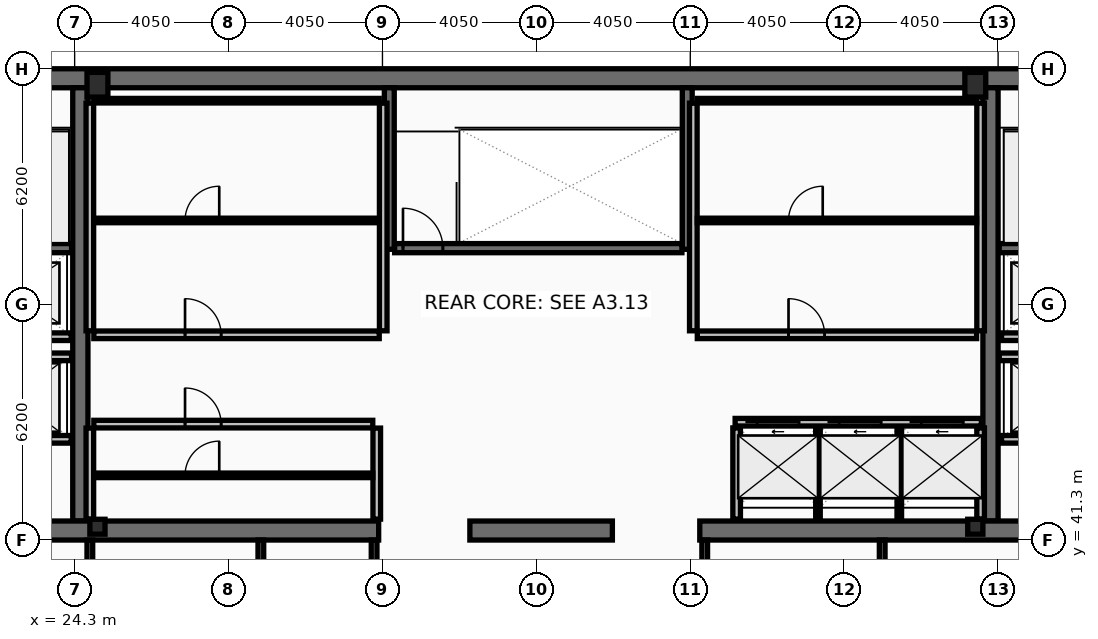
"""IFC4 building model, lengths in metres.
Left out: names, types, materials, properties, quantities, classifications, styles, units other than length and angle.
Written with IfcOpenShell. Run it as: python <this file> out.ifc"""

import sys

from ifc_helpers import new_model, si_unit, direction, frame, frame_2d, origin, origin_2d, place, context, subcontext, project, spatial, rectangle, hollow_rectangle, i_section, extrude, element, fill, save


model = new_model("IFC4")
c1 = context("Model", 3, precision=1e-05, world=origin(), true_north=direction((0.0, 1.0)))
c2 = subcontext(c1, "Body", "Model", "MODEL_VIEW")
j1 = project(units=[si_unit("LENGTHUNIT", "METRE"), si_unit("PLANEANGLEUNIT", "RADIAN")], contexts=[c1])
p1 = place(None, origin())
s1 = spatial("IfcSite", under=j1, at=p1, CompositionType="ELEMENT")
p2 = place(p1, origin())
s2 = spatial("IfcBuilding", under=s1, at=p2, CompositionType="ELEMENT")
p3 = place(p2, frame((0.0, 0.0, 347.0)))
s3 = spatial("IfcBuildingStorey", under=s2, at=p3, CompositionType="ELEMENT", Elevation=347.0)
p4 = place(p3, frame((16.2, 53.45, 0.0), z_axis=(0.0, 0.0, 1.0), x_axis=(1.0, 0.0, 0.0)))
e1 = element("IfcWall", 1, at=p4, inside=s3, PredefinedType="SHEAR", context=c2, shape_type="SweptSolid", body=[
    extrude(rectangle(XDim=40.5, YDim=0.5, at=frame_2d((20.25, 0.0))), origin(), (0.0, 0.0, 1.0), 3.38),
])
for number, where, z_axis, x_axis in (
    (2, (24.45, 41.8, 0.0), (0.0, 0.0, 1.0), (0.0, 1.0, 0.0)),
    (3, (48.4, 41.8, 0.0), (0.0, 0.0, 1.0), (0.0, 1.0, 0.0)),
):
    element("IfcWall", number, at=place(p3, frame(where, z_axis=z_axis, x_axis=x_axis)), inside=s3, PredefinedType="SHEAR", context=c2, shape_type="SweptSolid", body=[
        extrude(rectangle(XDim=11.4, YDim=0.4, at=frame_2d((5.7, 0.0))), origin(), (0.0, 0.0, 1.0), 3.38),
    ])
p5 = place(p3, frame((32.3, 41.55, 0.0), z_axis=(0.0, 0.0, 1.0), x_axis=(-1.0, 0.0, 0.0)))
e4 = element("IfcWall", 4, at=p5, inside=s3, PredefinedType="SHEAR", context=c2, shape_type="SweptSolid", body=[
    extrude(rectangle(XDim=11.45, YDim=0.5, at=frame_2d((5.725, 0.0))), origin(), (0.0, 0.0, 1.0), 3.38),
])
p6 = place(p3, frame((38.45, 41.55, 0.0), z_axis=(0.0, 0.0, 1.0), x_axis=(-1.0, 0.0, 0.0)))
e5 = element("IfcWall", 5, at=p6, inside=s3, PredefinedType="SHEAR", context=c2, shape_type="SweptSolid", body=[
    extrude(rectangle(XDim=3.75, YDim=0.5, at=frame_2d((1.875, 0.0))), origin(), (0.0, 0.0, 1.0), 3.38),
])
p7 = place(p3, frame((52.05, 41.55, 0.0), z_axis=(0.0, 0.0, 1.0), x_axis=(-1.0, 0.0, 0.0)))
e6 = element("IfcWall", 6, at=p7, inside=s3, PredefinedType="SHEAR", context=c2, shape_type="SweptSolid", body=[
    extrude(rectangle(XDim=11.3, YDim=0.5, at=frame_2d((5.65, 0.0))), origin(), (0.0, 0.0, 1.0), 3.38),
])
for number, where, z_axis, x_axis in (
    (7, (32.58, 48.95, 0.0), (0.0, 0.0, 1.0), (0.0, 1.0, 0.0)),
    (8, (40.42, 48.95, 0.0), (0.0, 0.0, 1.0), (0.0, 1.0, 0.0)),
):
    element("IfcWall", number, at=place(p3, frame(where, z_axis=z_axis, x_axis=x_axis)), inside=s3, PredefinedType="SHEAR", context=c2, shape_type="SweptSolid", body=[
        extrude(rectangle(XDim=4.25, YDim=0.26, at=frame_2d((2.125, 0.0))), origin(), (0.0, 0.0, 1.0), 3.38),
    ])
p8 = place(p3, frame((16.7, 48.98, 0.0), z_axis=(0.0, 0.0, 1.0), x_axis=(1.0, 0.0, 0.0)))
e9 = element("IfcWall", 9, at=p8, inside=s3, PredefinedType="SHEAR", context=c2, shape_type="SweptSolid", body=[
    extrude(rectangle(XDim=7.52, YDim=0.24, at=frame_2d((3.76, 0.0))), origin(), (0.0, 0.0, 1.0), 3.38),
])
p9 = place(p8, frame((0.22, 0.0, 0.0)))
e10 = element("IfcOpeningElement", 10, at=p9, cuts=e9, PredefinedType="OPENING", context=c2, shape_type="SweptSolid", body=[
    extrude(rectangle(XDim=1.05, YDim=2.15, at=frame_2d((0.525, 1.075))), frame((0.0, 0.13, 0.0), z_axis=(0.0, -1.0, 0.0), x_axis=(1.0, 0.0, 0.0)), (0.0, 0.0, 1.0), 0.26),
])
p10 = place(p3, frame((48.63, 48.98, 0.0), z_axis=(0.0, 0.0, 1.0), x_axis=(1.0, 0.0, 0.0)))
e11 = element("IfcWall", 11, at=p10, inside=s3, PredefinedType="SHEAR", context=c2, shape_type="SweptSolid", body=[
    extrude(rectangle(XDim=7.57, YDim=0.24, at=frame_2d((3.785, 0.0))), origin(), (0.0, 0.0, 1.0), 3.38),
])
p11 = place(p10, frame((6.3, 0.0, 0.0)))
e12 = element("IfcOpeningElement", 12, at=p11, cuts=e11, PredefinedType="OPENING", context=c2, shape_type="SweptSolid", body=[
    extrude(rectangle(XDim=1.05, YDim=2.15, at=frame_2d((0.525, 1.075))), frame((0.0, 0.13, 0.0), z_axis=(0.0, -1.0, 0.0), x_axis=(1.0, 0.0, 0.0)), (0.0, 0.0, 1.0), 0.26),
])
p12 = place(p3, frame((32.72, 48.98, 0.0), z_axis=(0.0, 0.0, 1.0), x_axis=(1.0, 0.0, 0.0)))
e13 = element("IfcWall", 13, at=p12, inside=s3, PredefinedType="SHEAR", context=c2, shape_type="SweptSolid", body=[
    extrude(rectangle(XDim=7.56, YDim=0.24, at=frame_2d((3.78, 0.0))), origin(), (0.0, 0.0, 1.0), 3.38),
])
p13 = place(p12, frame((0.22, 0.0, 0.0)))
e14 = element("IfcOpeningElement", 14, at=p13, cuts=e13, PredefinedType="OPENING", context=c2, shape_type="SweptSolid", body=[
    extrude(rectangle(XDim=1.05, YDim=2.15, at=frame_2d((0.525, 1.075))), frame((0.0, 0.13, 0.0), z_axis=(0.0, -1.0, 0.0), x_axis=(1.0, 0.0, 0.0)), (0.0, 0.0, 1.0), 0.26),
])
for number, where, z_axis, x_axis in (
    (15, (24.9, 53.28, 0.0), (0.0, 0.0, 1.0), (1.0, 0.0, 0.0)),
    (16, (48.0, 53.28, 0.0), (0.0, 0.0, 1.0), (1.0, 0.0, 0.0)),
):
    element("IfcColumn", number, at=place(p3, frame(where, z_axis=z_axis, x_axis=x_axis)), inside=s3, PredefinedType="COLUMN", context=c2, shape_type="SweptSolid", body=[
        extrude(hollow_rectangle(XDim=0.55, YDim=0.65, WallThickness=0.04, at=origin_2d()), origin(), (0.0, 0.0, 1.0), 3.6),
    ])
for number, where, z_axis, x_axis in (
    (17, (24.9, 41.65, 0.0), (0.0, 0.0, 1.0), (1.0, 0.0, 0.0)),
    (18, (48.0, 41.65, 0.0), (0.0, 0.0, 1.0), (1.0, 0.0, 0.0)),
):
    element("IfcColumn", number, at=place(p3, frame(where, z_axis=z_axis, x_axis=x_axis)), inside=s3, PredefinedType="COLUMN", context=c2, shape_type="SweptSolid", body=[
        extrude(i_section(OverallWidth=0.399, OverallDepth=0.393, WebThickness=0.023, FlangeThickness=0.037, at=origin_2d()), origin(), (0.0, 0.0, 1.0), 3.6),
    ])
p14 = place(p3, frame((41.68, 44.4, 0.0), z_axis=(0.0, 0.0, 1.0), x_axis=(1.0, 0.0, 0.0)))
e19 = element("IfcWall", 19, at=p14, inside=s3, PredefinedType="PARTITIONING", context=c2, shape_type="SweptSolid", body=[
    extrude(rectangle(XDim=6.48, YDim=0.2, at=frame_2d((3.24, 0.0))), origin(), (0.0, 0.0, 1.0), 3.38),
])
p15 = place(p14, frame((0.58, 0.0, 0.0)))
e20 = element("IfcOpeningElement", 20, at=p15, cuts=e19, PredefinedType="OPENING", context=c2, shape_type="SweptSolid", body=[
    extrude(rectangle(XDim=1.1, YDim=2.18, at=frame_2d((0.55, 1.09))), frame((0.0, 0.11, 0.0), z_axis=(0.0, -1.0, 0.0), x_axis=(1.0, 0.0, 0.0)), (0.0, 0.0, 1.0), 0.22),
])
p16 = place(p14, frame((2.74, 0.0, 0.0)))
e21 = element("IfcOpeningElement", 21, at=p16, cuts=e19, PredefinedType="OPENING", context=c2, shape_type="SweptSolid", body=[
    extrude(rectangle(XDim=1.1, YDim=2.18, at=frame_2d((0.55, 1.09))), frame((0.0, 0.11, 0.0), z_axis=(0.0, -1.0, 0.0), x_axis=(1.0, 0.0, 0.0)), (0.0, 0.0, 1.0), 0.22),
])
p17 = place(p14, frame((4.9, 0.0, 0.0)))
e22 = element("IfcOpeningElement", 22, at=p17, cuts=e19, PredefinedType="OPENING", context=c2, shape_type="SweptSolid", body=[
    extrude(rectangle(XDim=1.1, YDim=2.18, at=frame_2d((0.55, 1.09))), frame((0.0, 0.11, 0.0), z_axis=(0.0, -1.0, 0.0), x_axis=(1.0, 0.0, 0.0)), (0.0, 0.0, 1.0), 0.22),
])
p18 = place(p3, frame((51.61, 43.95, 0.0), z_axis=(0.0, 0.0, 1.0), x_axis=(-1.0, 0.0, 0.0)))
e23 = element("IfcWall", 23, at=p18, inside=s3, PredefinedType="PARTITIONING", context=c2, shape_type="SweptSolid", body=[
    extrude(rectangle(XDim=2.92, YDim=0.2, at=frame_2d((1.46, 0.0))), origin(), (0.0, 0.0, 1.0), 3.38),
])
p19 = place(p18, frame((0.81, 0.0, 0.0)))
e24 = element("IfcOpeningElement", 24, at=p19, cuts=e23, PredefinedType="OPENING", context=c2, shape_type="SweptSolid", body=[
    extrude(rectangle(XDim=1.3, YDim=2.18, at=frame_2d((0.65, 1.09))), frame((0.0, 0.11, 0.0), z_axis=(0.0, -1.0, 0.0), x_axis=(1.0, 0.0, 0.0)), (0.0, 0.0, 1.0), 0.22),
])
p20 = place(p3, frame((24.21, 43.95, 0.0), z_axis=(0.0, 0.0, 1.0), x_axis=(-1.0, 0.0, 0.0)))
e25 = element("IfcWall", 25, at=p20, inside=s3, PredefinedType="PARTITIONING", context=c2, shape_type="SweptSolid", body=[
    extrude(rectangle(XDim=2.97, YDim=0.2, at=frame_2d((1.485, 0.0))), origin(), (0.0, 0.0, 1.0), 3.38),
])
p21 = place(p20, frame((0.86, 0.0, 0.0)))
e26 = element("IfcOpeningElement", 26, at=p21, cuts=e25, PredefinedType="OPENING", context=c2, shape_type="SweptSolid", body=[
    extrude(rectangle(XDim=1.3, YDim=2.18, at=frame_2d((0.65, 1.09))), frame((0.0, 0.11, 0.0), z_axis=(0.0, -1.0, 0.0), x_axis=(1.0, 0.0, 0.0)), (0.0, 0.0, 1.0), 0.22),
])
p22 = place(p3, frame((51.61, 46.65, 0.0), z_axis=(0.0, 0.0, 1.0), x_axis=(-1.0, 0.0, 0.0)))
e27 = element("IfcWall", 27, at=p22, inside=s3, PredefinedType="PARTITIONING", context=c2, shape_type="SweptSolid", body=[
    extrude(rectangle(XDim=2.92, YDim=0.2, at=frame_2d((1.46, 0.0))), origin(), (0.0, 0.0, 1.0), 3.38),
])
p23 = place(p22, frame((0.86, 0.0, 0.0)))
e28 = element("IfcOpeningElement", 28, at=p23, cuts=e27, PredefinedType="OPENING", context=c2, shape_type="SweptSolid", body=[
    extrude(rectangle(XDim=1.2, YDim=2.18, at=frame_2d((0.6, 1.09))), frame((0.0, 0.11, 0.0), z_axis=(0.0, -1.0, 0.0), x_axis=(1.0, 0.0, 0.0)), (0.0, 0.0, 1.0), 0.22),
])
p24 = place(p3, frame((24.21, 46.65, 0.0), z_axis=(0.0, 0.0, 1.0), x_axis=(-1.0, 0.0, 0.0)))
e29 = element("IfcWall", 29, at=p24, inside=s3, PredefinedType="PARTITIONING", context=c2, shape_type="SweptSolid", body=[
    extrude(rectangle(XDim=2.97, YDim=0.2, at=frame_2d((1.485, 0.0))), origin(), (0.0, 0.0, 1.0), 3.38),
])
p25 = place(p24, frame((0.91, 0.0, 0.0)))
e30 = element("IfcOpeningElement", 30, at=p25, cuts=e29, PredefinedType="OPENING", context=c2, shape_type="SweptSolid", body=[
    extrude(rectangle(XDim=1.2, YDim=2.18, at=frame_2d((0.6, 1.09))), frame((0.0, 0.11, 0.0), z_axis=(0.0, -1.0, 0.0), x_axis=(1.0, 0.0, 0.0)), (0.0, 0.0, 1.0), 0.22),
])
p26 = place(p3, frame((21.2, 46.12, 0.0), z_axis=(0.0, 0.0, 1.0), x_axis=(1.0, 0.0, 0.0)))
e31 = element("IfcWall", 31, at=p26, inside=s3, PredefinedType="PARTITIONING", context=c2, shape_type="SweptSolid", body=[
    extrude(rectangle(XDim=3.02, YDim=0.2, at=frame_2d((1.51, 0.0))), origin(), (0.0, 0.0, 1.0), 3.38),
])
p27 = place(p3, frame((48.63, 46.12, 0.0), z_axis=(0.0, 0.0, 1.0), x_axis=(1.0, 0.0, 0.0)))
e32 = element("IfcWall", 32, at=p27, inside=s3, PredefinedType="PARTITIONING", context=c2, shape_type="SweptSolid", body=[
    extrude(rectangle(XDim=3.07, YDim=0.2, at=frame_2d((1.535, 0.0))), origin(), (0.0, 0.0, 1.0), 3.38),
])
for number, where, z_axis, x_axis in (
    (33, (24.7, 46.805, 0.0), (0.0, 0.0, 1.0), (0.0, 1.0, 0.0)),
    (34, (32.42, 46.805, 0.0), (0.0, 0.0, 1.0), (0.0, 1.0, 0.0)),
):
    element("IfcWall", number, at=place(p3, frame(where, z_axis=z_axis, x_axis=x_axis)), inside=s3, PredefinedType="PARTITIONING", context=c2, shape_type="SweptSolid", body=[
        extrude(rectangle(XDim=5.99, YDim=0.2, at=frame_2d((2.995, 0.0))), origin(), (0.0, 0.0, 1.0), 3.38),
    ])
p28 = place(p3, frame((24.805, 52.86, 0.0), z_axis=(0.0, 0.0, 1.0), x_axis=(1.0, 0.0, 0.0)))
e35 = element("IfcWall", 35, at=p28, inside=s3, PredefinedType="PARTITIONING", context=c2, shape_type="SweptSolid", body=[
    extrude(rectangle(XDim=7.51, YDim=0.12, at=frame_2d((3.755, 0.0))), origin(), (0.0, 0.0, 1.0), 3.38),
])
p29 = place(p3, frame((24.805, 49.709, 0.0), z_axis=(0.0, 0.0, 1.0), x_axis=(1.0, 0.0, 0.0)))
e36 = element("IfcWall", 36, at=p29, inside=s3, PredefinedType="PARTITIONING", context=c2, shape_type="SweptSolid", body=[
    extrude(rectangle(XDim=7.51, YDim=0.12, at=frame_2d((3.755, 0.0))), origin(), (0.0, 0.0, 1.0), 3.38),
])
p30 = place(p29, frame((2.4, 0.0, 0.0)))
e37 = element("IfcOpeningElement", 37, at=p30, cuts=e36, PredefinedType="OPENING", context=c2, shape_type="SweptSolid", body=[
    extrude(rectangle(XDim=0.9, YDim=2.05, at=frame_2d((0.45, 1.025))), frame((0.0, 0.07, 0.0), z_axis=(0.0, -1.0, 0.0), x_axis=(1.0, 0.0, 0.0)), (0.0, 0.0, 1.0), 0.14),
])
p31 = place(p3, frame((24.805, 46.7, 0.0), z_axis=(0.0, 0.0, 1.0), x_axis=(1.0, 0.0, 0.0)))
e38 = element("IfcWall", 38, at=p31, inside=s3, PredefinedType="PARTITIONING", context=c2, shape_type="SweptSolid", body=[
    extrude(rectangle(XDim=7.51, YDim=0.2, at=frame_2d((3.755, 0.0))), origin(), (0.0, 0.0, 1.0), 3.38),
])
p32 = place(p31, frame((2.4, 0.0, 0.0)))
e39 = element("IfcOpeningElement", 39, at=p32, cuts=e38, PredefinedType="OPENING", context=c2, shape_type="SweptSolid", body=[
    extrude(rectangle(XDim=0.95, YDim=2.1, at=frame_2d((0.475, 1.05))), frame((0.0, 0.11, 0.0), z_axis=(0.0, -1.0, 0.0), x_axis=(1.0, 0.0, 0.0)), (0.0, 0.0, 1.0), 0.22),
])
for number, where, z_axis, x_axis in (
    (40, (24.7, 41.85, 0.0), (0.0, 0.0, 1.0), (0.0, 1.0, 0.0)),
    (41, (32.25, 41.85, 0.0), (0.0, 0.0, 1.0), (0.0, 1.0, 0.0)),
):
    element("IfcWall", number, at=place(p3, frame(where, z_axis=z_axis, x_axis=x_axis)), inside=s3, PredefinedType="PARTITIONING", context=c2, shape_type="SweptSolid", body=[
        extrude(rectangle(XDim=2.395, YDim=0.2, at=frame_2d((1.198, 0.0))), origin(), (0.0, 0.0, 1.0), 3.38),
    ])
p33 = place(p3, frame((24.805, 43.002, 0.0), z_axis=(0.0, 0.0, 1.0), x_axis=(1.0, 0.0, 0.0)))
e42 = element("IfcWall", 42, at=p33, inside=s3, PredefinedType="PARTITIONING", context=c2, shape_type="SweptSolid", body=[
    extrude(rectangle(XDim=7.34, YDim=0.12, at=frame_2d((3.67, 0.0))), origin(), (0.0, 0.0, 1.0), 3.38),
])
p34 = place(p33, frame((2.4, 0.0, 0.0)))
e43 = element("IfcOpeningElement", 43, at=p34, cuts=e42, PredefinedType="OPENING", context=c2, shape_type="SweptSolid", body=[
    extrude(rectangle(XDim=0.9, YDim=2.05, at=frame_2d((0.45, 1.025))), frame((0.0, 0.07, 0.0), z_axis=(0.0, -1.0, 0.0), x_axis=(1.0, 0.0, 0.0)), (0.0, 0.0, 1.0), 0.14),
])
p35 = place(p3, frame((24.805, 44.35, 0.0), z_axis=(0.0, 0.0, 1.0), x_axis=(1.0, 0.0, 0.0)))
e44 = element("IfcWall", 44, at=p35, inside=s3, PredefinedType="PARTITIONING", context=c2, shape_type="SweptSolid", body=[
    extrude(rectangle(XDim=7.34, YDim=0.2, at=frame_2d((3.67, 0.0))), origin(), (0.0, 0.0, 1.0), 3.38),
])
p36 = place(p35, frame((2.4, 0.0, 0.0)))
e45 = element("IfcOpeningElement", 45, at=p36, cuts=e44, PredefinedType="OPENING", context=c2, shape_type="SweptSolid", body=[
    extrude(rectangle(XDim=0.95, YDim=2.1, at=frame_2d((0.475, 1.05))), frame((0.0, 0.11, 0.0), z_axis=(0.0, -1.0, 0.0), x_axis=(1.0, 0.0, 0.0)), (0.0, 0.0, 1.0), 0.22),
])
for number, where, z_axis, x_axis in (
    (46, (40.58, 46.805, 0.0), (0.0, 0.0, 1.0), (0.0, 1.0, 0.0)),
    (47, (48.14, 46.805, 0.0), (0.0, 0.0, 1.0), (0.0, 1.0, 0.0)),
):
    element("IfcWall", number, at=place(p3, frame(where, z_axis=z_axis, x_axis=x_axis)), inside=s3, PredefinedType="PARTITIONING", context=c2, shape_type="SweptSolid", body=[
        extrude(rectangle(XDim=5.99, YDim=0.2, at=frame_2d((2.995, 0.0))), origin(), (0.0, 0.0, 1.0), 3.38),
    ])
p37 = place(p3, frame((40.685, 52.86, 0.0), z_axis=(0.0, 0.0, 1.0), x_axis=(1.0, 0.0, 0.0)))
e48 = element("IfcWall", 48, at=p37, inside=s3, PredefinedType="PARTITIONING", context=c2, shape_type="SweptSolid", body=[
    extrude(rectangle(XDim=7.35, YDim=0.12, at=frame_2d((3.675, 0.0))), origin(), (0.0, 0.0, 1.0), 3.38),
])
p38 = place(p3, frame((40.685, 49.709, 0.0), z_axis=(0.0, 0.0, 1.0), x_axis=(1.0, 0.0, 0.0)))
e49 = element("IfcWall", 49, at=p38, inside=s3, PredefinedType="PARTITIONING", context=c2, shape_type="SweptSolid", body=[
    extrude(rectangle(XDim=7.35, YDim=0.12, at=frame_2d((3.675, 0.0))), origin(), (0.0, 0.0, 1.0), 3.38),
])
p39 = place(p38, frame((2.4, 0.0, 0.0)))
e50 = element("IfcOpeningElement", 50, at=p39, cuts=e49, PredefinedType="OPENING", context=c2, shape_type="SweptSolid", body=[
    extrude(rectangle(XDim=0.9, YDim=2.05, at=frame_2d((0.45, 1.025))), frame((0.0, 0.07, 0.0), z_axis=(0.0, -1.0, 0.0), x_axis=(1.0, 0.0, 0.0)), (0.0, 0.0, 1.0), 0.14),
])
p40 = place(p3, frame((40.685, 46.7, 0.0), z_axis=(0.0, 0.0, 1.0), x_axis=(1.0, 0.0, 0.0)))
e51 = element("IfcWall", 51, at=p40, inside=s3, PredefinedType="PARTITIONING", context=c2, shape_type="SweptSolid", body=[
    extrude(rectangle(XDim=7.35, YDim=0.2, at=frame_2d((3.675, 0.0))), origin(), (0.0, 0.0, 1.0), 3.38),
])
p41 = place(p40, frame((2.4, 0.0, 0.0)))
e52 = element("IfcOpeningElement", 52, at=p41, cuts=e51, PredefinedType="OPENING", context=c2, shape_type="SweptSolid", body=[
    extrude(rectangle(XDim=0.95, YDim=2.1, at=frame_2d((0.475, 1.05))), frame((0.0, 0.11, 0.0), z_axis=(0.0, -1.0, 0.0), x_axis=(1.0, 0.0, 0.0)), (0.0, 0.0, 1.0), 0.22),
])
for number, where, z_axis, x_axis in (
    (53, (41.72, 41.85, 0.0), (0.0, 0.0, 1.0), (0.0, 1.0, 0.0)),
    (54, (48.14, 41.85, 0.0), (0.0, 0.0, 1.0), (0.0, 1.0, 0.0)),
):
    element("IfcWall", number, at=place(p3, frame(where, z_axis=z_axis, x_axis=x_axis)), inside=s3, PredefinedType="PARTITIONING", context=c2, shape_type="SweptSolid", body=[
        extrude(rectangle(XDim=2.4, YDim=0.2, at=frame_2d((1.2, 0.0))), origin(), (0.0, 0.0, 1.0), 3.38),
    ])
for number, where, z_axis, x_axis in (
    (55, (43.86, 41.85, 0.0), (0.0, 0.0, 1.0), (0.0, 1.0, 0.0)),
    (56, (46.0, 41.85, 0.0), (0.0, 0.0, 1.0), (0.0, 1.0, 0.0)),
):
    element("IfcWall", number, at=place(p3, frame(where, z_axis=z_axis, x_axis=x_axis)), inside=s3, PredefinedType="PARTITIONING", context=c2, shape_type="SweptSolid", body=[
        extrude(rectangle(XDim=2.4, YDim=0.12, at=frame_2d((1.2, 0.0))), origin(), (0.0, 0.0, 1.0), 3.38),
    ])
p42 = place(p3, frame((24.7, 38.28, 0.0), z_axis=(0.0, 0.0, 1.0), x_axis=(0.0, 1.0, 0.0)))
e57 = element("IfcWall", 57, at=p42, inside=s3, PredefinedType="PARTITIONING", context=c2, shape_type="SweptSolid", body=[
    extrude(rectangle(XDim=3.02, YDim=0.15, at=frame_2d((1.51, 0.0))), origin(), (0.0, 0.0, 1.0), 2.77),
])
for number, where, z_axis, x_axis in (
    (58, (29.2, 38.28, 0.0), (0.0, 0.0, 1.0), (0.0, 1.0, 0.0)),
    (59, (32.18, 38.28, 0.0), (0.0, 0.0, 1.0), (0.0, 1.0, 0.0)),
    (60, (40.88, 38.28, 0.0), (0.0, 0.0, 1.0), (0.0, 1.0, 0.0)),
    (61, (45.55, 38.28, 0.0), (0.0, 0.0, 1.0), (0.0, 1.0, 0.0)),
):
    element("IfcWall", number, at=place(p3, frame(where, z_axis=z_axis, x_axis=x_axis)), inside=s3, PredefinedType="PARTITIONING", context=c2, shape_type="SweptSolid", body=[
        extrude(rectangle(XDim=3.02, YDim=0.15, at=frame_2d((1.51, 0.0))), origin(), (0.0, 0.0, 1.0), 3.38),
    ])
p43 = place(p13, origin())
e62 = element("IfcDoor", 62, at=p43, inside=s3, OperationType="SINGLE_SWING_LEFT", PredefinedType="DOOR", context=c2, shape_type="SweptSolid", body=[
    extrude(rectangle(XDim=1.05, YDim=2.15, at=frame_2d((0.525, 1.075))), frame((0.0, 0.025, 0.0), z_axis=(0.0, -1.0, 0.0), x_axis=(1.0, 0.0, 0.0)), (0.0, 0.0, 1.0), 0.05),
])
fill(e14, e62)
p44 = place(p15, origin())
e63 = element("IfcDoor", 63, at=p44, inside=s3, OperationType="SLIDING_TO_LEFT", PredefinedType="DOOR", context=c2, shape_type="SweptSolid", body=[
    extrude(rectangle(XDim=1.1, YDim=2.18, at=frame_2d((0.55, 1.09))), frame((0.0, 0.025, 0.0), z_axis=(0.0, -1.0, 0.0), x_axis=(1.0, 0.0, 0.0)), (0.0, 0.0, 1.0), 0.05),
])
fill(e20, e63)
p45 = place(p16, origin())
e64 = element("IfcDoor", 64, at=p45, inside=s3, OperationType="SLIDING_TO_LEFT", PredefinedType="DOOR", context=c2, shape_type="SweptSolid", body=[
    extrude(rectangle(XDim=1.1, YDim=2.18, at=frame_2d((0.55, 1.09))), frame((0.0, 0.025, 0.0), z_axis=(0.0, -1.0, 0.0), x_axis=(1.0, 0.0, 0.0)), (0.0, 0.0, 1.0), 0.05),
])
fill(e21, e64)
p46 = place(p17, origin())
e65 = element("IfcDoor", 65, at=p46, inside=s3, OperationType="SLIDING_TO_LEFT", PredefinedType="DOOR", context=c2, shape_type="SweptSolid", body=[
    extrude(rectangle(XDim=1.1, YDim=2.18, at=frame_2d((0.55, 1.09))), frame((0.0, 0.025, 0.0), z_axis=(0.0, -1.0, 0.0), x_axis=(1.0, 0.0, 0.0)), (0.0, 0.0, 1.0), 0.05),
])
fill(e22, e65)
p47 = place(p30, origin())
e66 = element("IfcDoor", 66, at=p47, inside=s3, OperationType="SINGLE_SWING_RIGHT", PredefinedType="DOOR", context=c2, shape_type="SweptSolid", body=[
    extrude(rectangle(XDim=0.9, YDim=2.05, at=frame_2d((0.45, 1.025))), frame((0.0, 0.025, 0.0), z_axis=(0.0, -1.0, 0.0), x_axis=(1.0, 0.0, 0.0)), (0.0, 0.0, 1.0), 0.05),
])
fill(e37, e66)
p48 = place(p32, origin())
e67 = element("IfcDoor", 67, at=p48, inside=s3, OperationType="SINGLE_SWING_LEFT", PredefinedType="DOOR", context=c2, shape_type="SweptSolid", body=[
    extrude(rectangle(XDim=0.95, YDim=2.1, at=frame_2d((0.475, 1.05))), frame((0.0, 0.025, 0.0), z_axis=(0.0, -1.0, 0.0), x_axis=(1.0, 0.0, 0.0)), (0.0, 0.0, 1.0), 0.05),
])
fill(e39, e67)
p49 = place(p34, origin())
e68 = element("IfcDoor", 68, at=p49, inside=s3, OperationType="SINGLE_SWING_RIGHT", PredefinedType="DOOR", context=c2, shape_type="SweptSolid", body=[
    extrude(rectangle(XDim=0.9, YDim=2.05, at=frame_2d((0.45, 1.025))), frame((0.0, 0.025, 0.0), z_axis=(0.0, -1.0, 0.0), x_axis=(1.0, 0.0, 0.0)), (0.0, 0.0, 1.0), 0.05),
])
fill(e43, e68)
p50 = place(p36, origin())
e69 = element("IfcDoor", 69, at=p50, inside=s3, OperationType="SINGLE_SWING_LEFT", PredefinedType="DOOR", context=c2, shape_type="SweptSolid", body=[
    extrude(rectangle(XDim=0.95, YDim=2.1, at=frame_2d((0.475, 1.05))), frame((0.0, 0.025, 0.0), z_axis=(0.0, -1.0, 0.0), x_axis=(1.0, 0.0, 0.0)), (0.0, 0.0, 1.0), 0.05),
])
fill(e45, e69)
p51 = place(p39, origin())
e70 = element("IfcDoor", 70, at=p51, inside=s3, OperationType="SINGLE_SWING_RIGHT", PredefinedType="DOOR", context=c2, shape_type="SweptSolid", body=[
    extrude(rectangle(XDim=0.9, YDim=2.05, at=frame_2d((0.45, 1.025))), frame((0.0, 0.025, 0.0), z_axis=(0.0, -1.0, 0.0), x_axis=(1.0, 0.0, 0.0)), (0.0, 0.0, 1.0), 0.05),
])
fill(e50, e70)
p52 = place(p41, origin())
e71 = element("IfcDoor", 71, at=p52, inside=s3, OperationType="SINGLE_SWING_LEFT", PredefinedType="DOOR", context=c2, shape_type="SweptSolid", body=[
    extrude(rectangle(XDim=0.95, YDim=2.1, at=frame_2d((0.475, 1.05))), frame((0.0, 0.025, 0.0), z_axis=(0.0, -1.0, 0.0), x_axis=(1.0, 0.0, 0.0)), (0.0, 0.0, 1.0), 0.05),
])
fill(e52, e71)
save(model, sys.argv[1])
